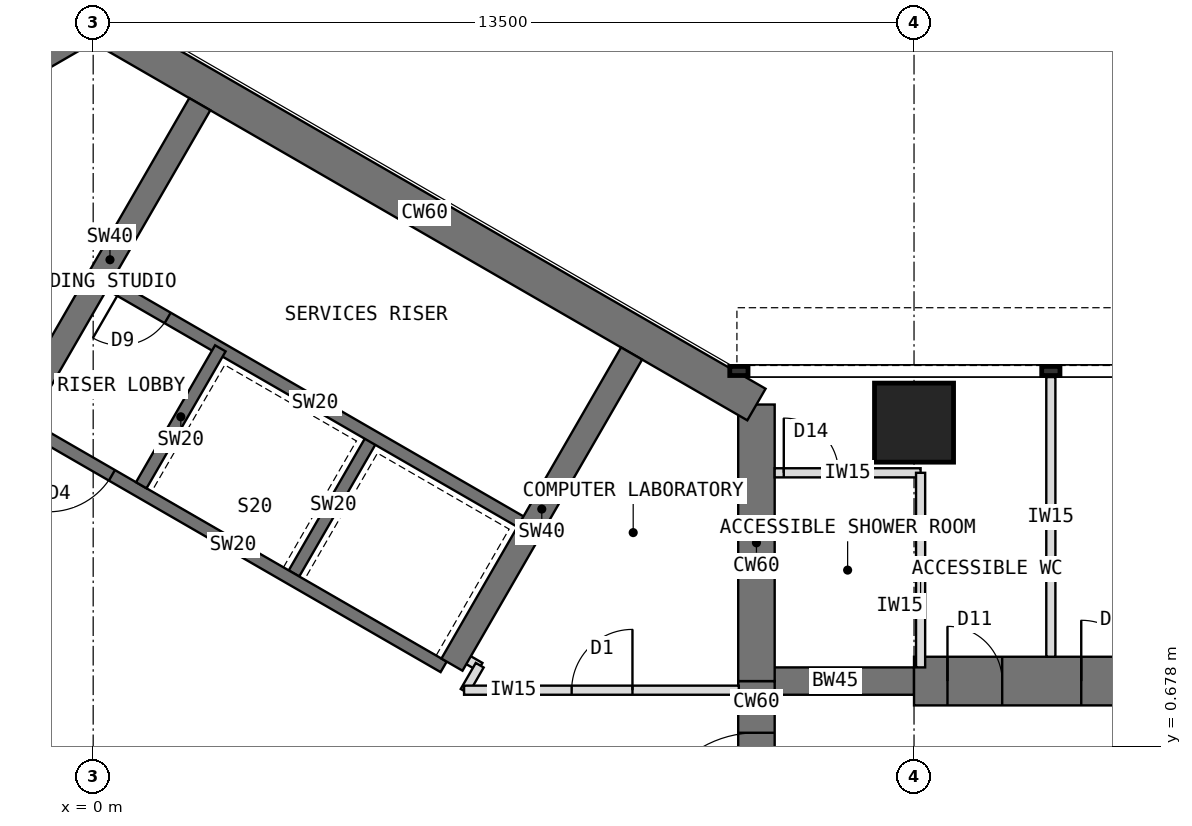
"""IFC4 building model, lengths in metres.
Left out: names, types, materials, properties, quantities, classifications, styles, units other than length and angle.
Written with IfcOpenShell. Run it as: python <this file> out.ifc"""

import sys

from ifc_helpers import new_model, si_unit, direction, frame, frame_2d, origin, origin_2d, place, context, subcontext, project, spatial, rectangle, extrude, element, fill, save


model = new_model("IFC4")
c1 = context("Model", 3, precision=1e-05, world=origin(), true_north=direction((0.0, 1.0)))
c2 = subcontext(c1, "Body", "Model", "MODEL_VIEW")
j1 = project(units=[si_unit("LENGTHUNIT", "METRE"), si_unit("PLANEANGLEUNIT", "RADIAN")], contexts=[c1])
p1 = place(None, origin())
s1 = spatial("IfcSite", under=j1, at=p1, CompositionType="ELEMENT")
p2 = place(p1, origin())
s2 = spatial("IfcBuilding", under=s1, at=p2, CompositionType="ELEMENT")
p3 = place(p2, frame((0.0, 0.0, 125.5)))
s3 = spatial("IfcBuildingStorey", under=s2, at=p3, CompositionType="ELEMENT", Elevation=125.5)
p4 = place(p3, frame((10.908, -1.75, 0.0), z_axis=(0.0, 0.0, 1.0), x_axis=(0.0, 1.0, 0.0)))
e1 = element("IfcWall", 1, at=p4, inside=s3, PredefinedType="SHEAR", context=c2, shape_type="SweptSolid", body=[
    extrude(rectangle(XDim=3.5, YDim=0.6, at=frame_2d((1.75, 0.0))), origin(), (0.0, 0.0, 1.0), 4.0),
])
p5 = place(p4, frame((0.85, 0.0, 0.0)))
e2 = element("IfcOpeningElement", 2, at=p5, cuts=e1, PredefinedType="OPENING", context=c2, shape_type="SweptSolid", body=[
    extrude(rectangle(XDim=1.8, YDim=2.1, at=frame_2d((0.9, 1.05))), frame((0.0, 0.31, 0.0), z_axis=(0.0, -1.0, 0.0), x_axis=(1.0, 0.0, 0.0)), (0.0, 0.0, 1.0), 0.62),
])
p6 = place(p3, frame((10.908, 1.75, 0.0), z_axis=(0.0, 0.0, 1.0), x_axis=(0.0, 1.0, 0.0)))
e3 = element("IfcWall", 3, at=p6, inside=s3, PredefinedType="SHEAR", context=c2, shape_type="SweptSolid", body=[
    extrude(rectangle(XDim=4.548, YDim=0.6, at=frame_2d((2.274, 0.0))), origin(), (0.0, 0.0, 1.0), 4.0),
])
p7 = place(p3, frame((10.908, 6.298, 0.0), z_axis=(0.0, 0.0, 1.0), x_axis=(-0.866021940709, 0.500005998175, 0.0)))
e4 = element("IfcWall", 4, at=p7, inside=s3, PredefinedType="SHEAR", context=c2, shape_type="SweptSolid", body=[
    extrude(rectangle(XDim=12.596, YDim=0.6, at=frame_2d((6.298, 0.0))), origin(), (0.0, 0.0, 1.0), 4.0),
])
p8 = place(p3, frame((0.0, 12.596, 0.0), z_axis=(0.0, 0.0, 1.0), x_axis=(-0.866011268655, -0.500024481964, 0.0)))
e5 = element("IfcWall", 5, at=p8, inside=s3, PredefinedType="SHEAR", context=c2, shape_type="SweptSolid", body=[
    extrude(rectangle(XDim=4.548, YDim=0.6, at=frame_2d((2.274, 0.0))), origin(), (0.0, 0.0, 1.0), 4.0),
])
p9 = place(p3, frame((10.908, 1.75, 0.0), z_axis=(0.0, 0.0, 1.0), x_axis=(1.0, 0.0, 0.0)))
e6 = element("IfcWall", 6, at=p9, inside=s3, PredefinedType="SHEAR", context=c2, shape_type="SweptSolid", body=[
    extrude(rectangle(XDim=2.592, YDim=0.45, at=frame_2d((1.296, 0.0))), origin(), (0.0, 0.0, 1.0), 4.0),
])
p10 = place(p3, frame((13.5, 1.75, 0.0), z_axis=(0.0, 0.0, 1.0), x_axis=(1.0, 0.0, 0.0)))
e7 = element("IfcWall", 7, at=p10, inside=s3, PredefinedType="SHEAR", context=c2, shape_type="SweptSolid", body=[
    extrude(rectangle(XDim=13.2, YDim=0.8, at=frame_2d((6.6, 0.0))), origin(), (0.0, 0.0, 1.0), 4.0),
])
p11 = place(p10, frame((0.55, 0.0, 0.0)))
e8 = element("IfcOpeningElement", 8, at=p11, cuts=e7, PredefinedType="OPENING", context=c2, shape_type="SweptSolid", body=[
    extrude(rectangle(XDim=0.9, YDim=2.1, at=frame_2d((0.45, 1.05))), frame((0.0, 0.41, 0.0), z_axis=(0.0, -1.0, 0.0), x_axis=(1.0, 0.0, 0.0)), (0.0, 0.0, 1.0), 0.82),
])
p12 = place(p10, frame((2.75, 0.0, 0.0)))
e9 = element("IfcOpeningElement", 9, at=p12, cuts=e7, PredefinedType="OPENING", context=c2, shape_type="SweptSolid", body=[
    extrude(rectangle(XDim=1.0, YDim=2.1, at=frame_2d((0.5, 1.05))), frame((0.0, 0.41, 0.0), z_axis=(0.0, -1.0, 0.0), x_axis=(1.0, 0.0, 0.0)), (0.0, 0.0, 1.0), 0.82),
])
p13 = place(p10, frame((7.25, 0.0, 0.0)))
e10 = element("IfcOpeningElement", 10, at=p13, cuts=e7, PredefinedType="OPENING", context=c2, shape_type="SweptSolid", body=[
    extrude(rectangle(XDim=1.0, YDim=2.1, at=frame_2d((0.5, 1.05))), frame((0.0, 0.41, 0.0), z_axis=(0.0, -1.0, 0.0), x_axis=(1.0, 0.0, 0.0)), (0.0, 0.0, 1.0), 0.82),
])
p14 = place(p3, frame((13.5, 6.0, 0.0), z_axis=(0.0, 0.0, 1.0), x_axis=(1.0, 0.0, 0.0)))
e11 = element("IfcColumn", 11, at=p14, inside=s3, PredefinedType="COLUMN", context=c2, shape_type="SweptSolid", body=[
    extrude(rectangle(XDim=1.3, YDim=1.3, at=origin_2d()), origin(), (0.0, 0.0, 1.0), 4.0),
])
p15 = place(p3, frame((5.764, 1.984, 0.0), z_axis=(0.0, 0.0, 1.0), x_axis=(-0.866026010844, 0.49999894854, 0.0)))
e12 = element("IfcWall", 12, at=p15, inside=s3, PredefinedType="SHEAR", context=c2, shape_type="SweptSolid", body=[
    extrude(rectangle(XDim=8.0, YDim=0.2, at=frame_2d((4.0, 0.0))), origin(), (0.0, 0.0, 1.0), 4.0),
])
p16 = place(p15, frame((6.3, 0.0, 0.0)))
e13 = element("IfcOpeningElement", 13, at=p16, cuts=e12, PredefinedType="OPENING", context=c2, shape_type="SweptSolid", body=[
    extrude(rectangle(XDim=1.2, YDim=2.1, at=frame_2d((0.6, 1.05))), frame((0.0, 0.11, 0.0), z_axis=(0.0, -1.0, 0.0), x_axis=(1.0, 0.0, 0.0)), (0.0, 0.0, 1.0), 0.22),
])
for number, where, z_axis, x_axis in (
    (14, (3.303, 3.52, 0.0), (0.0, 0.0, 1.0), (0.5, 0.866, 0.0)),
    (15, (0.791, 4.97, 0.0), (0.0, 0.0, 1.0), (0.5, 0.866, 0.0)),
):
    element("IfcWall", number, at=place(p3, frame(where, z_axis=z_axis, x_axis=x_axis)), inside=s3, PredefinedType="SHEAR", context=c2, shape_type="SweptSolid", body=[
        extrude(rectangle(XDim=2.6, YDim=0.2, at=frame_2d((1.3, 0.0))), origin(), (0.0, 0.0, 1.0), 4.0),
    ])
p17 = place(p3, frame((7.114, 4.322, 0.0), z_axis=(0.0, 0.0, 1.0), x_axis=(-0.866026010844, 0.49999894854, 0.0)))
e16 = element("IfcWall", 16, at=p17, inside=s3, PredefinedType="SHEAR", context=c2, shape_type="SweptSolid", body=[
    extrude(rectangle(XDim=8.0, YDim=0.2, at=frame_2d((4.0, 0.0))), origin(), (0.0, 0.0, 1.0), 4.0),
])
p18 = place(p17, frame((6.8, 0.0, 0.0)))
e17 = element("IfcOpeningElement", 17, at=p18, cuts=e16, PredefinedType="OPENING", context=c2, shape_type="SweptSolid", body=[
    extrude(rectangle(XDim=0.9, YDim=2.1, at=frame_2d((0.45, 1.05))), frame((0.0, 0.11, 0.0), z_axis=(0.0, -1.0, 0.0), x_axis=(1.0, 0.0, 0.0)), (0.0, 0.0, 1.0), 0.22),
])
p19 = place(p3, frame((-1.201, 6.12, 0.0), z_axis=(0.0, 0.0, 1.0), x_axis=(0.49999668571, 0.866027317282, 0.0)))
e18 = element("IfcWall", 18, at=p19, inside=s3, PredefinedType="SHEAR", context=c2, shape_type="SweptSolid", body=[
    extrude(rectangle(XDim=5.908, YDim=0.4, at=frame_2d((2.954, 0.0))), origin(), (0.0, 0.0, 1.0), 4.0),
])
p20 = place(p3, frame((5.901, 2.02, 0.0), z_axis=(0.0, 0.0, 1.0), x_axis=(0.500027676417, 0.866009424208, 0.0)))
e19 = element("IfcWall", 19, at=p20, inside=s3, PredefinedType="SHEAR", context=c2, shape_type="SweptSolid", body=[
    extrude(rectangle(XDim=5.908, YDim=0.4, at=frame_2d((2.954, 0.0))), origin(), (0.0, 0.0, 1.0), 4.0),
])
p21 = place(p3, frame((15.75, 2.15, 0.0), z_axis=(0.0, 0.0, 1.0), x_axis=(0.0, 1.0, 0.0)))
e20 = element("IfcWall", 20, at=p21, inside=s3, PredefinedType="PARTITIONING", context=c2, shape_type="SweptSolid", body=[
    extrude(rectangle(XDim=4.6, YDim=0.15, at=frame_2d((2.3, 0.0))), origin(), (0.0, 0.0, 1.0), 3.8),
])
p22 = place(p3, frame((11.208, 5.175, 0.0), z_axis=(0.0, 0.0, 1.0), x_axis=(1.0, 0.0, 0.0)))
e21 = element("IfcWall", 21, at=p22, inside=s3, PredefinedType="PARTITIONING", context=c2, shape_type="SweptSolid", body=[
    extrude(rectangle(XDim=2.4, YDim=0.15, at=frame_2d((1.2, 0.0))), origin(), (0.0, 0.0, 1.0), 3.8),
])
p23 = place(p22, frame((0.15, 0.0, 0.0)))
e22 = element("IfcOpeningElement", 22, at=p23, cuts=e21, PredefinedType="OPENING", context=c2, shape_type="SweptSolid", body=[
    extrude(rectangle(XDim=0.9, YDim=2.1, at=frame_2d((0.45, 1.05))), frame((0.0, 0.085, 0.0), z_axis=(0.0, -1.0, 0.0), x_axis=(1.0, 0.0, 0.0)), (0.0, 0.0, 1.0), 0.17),
])
p24 = place(p3, frame((13.608, 1.975, 0.0), z_axis=(0.0, 0.0, 1.0), x_axis=(0.0, 1.0, 0.0)))
e23 = element("IfcWall", 23, at=p24, inside=s3, PredefinedType="PARTITIONING", context=c2, shape_type="SweptSolid", body=[
    extrude(rectangle(XDim=3.2, YDim=0.15, at=frame_2d((1.6, 0.0))), origin(), (0.0, 0.0, 1.0), 3.8),
])
p25 = place(p3, frame((5.992, 2.198, 0.0), z_axis=(0.0, 0.0, 1.0), x_axis=(0.865892400268, -0.500230298122, 0.0)))
e24 = element("IfcWall", 24, at=p25, inside=s3, PredefinedType="PARTITIONING", context=c2, shape_type="SweptSolid", body=[
    extrude(rectangle(XDim=0.43, YDim=0.15, at=frame_2d((0.215, 0.0))), origin(), (0.0, 0.0, 1.0), 3.8),
])
p26 = place(p3, frame((6.357, 2.011, 0.0), z_axis=(0.0, 0.0, 1.0), x_axis=(-0.50033519877, -0.865831790172, 0.0)))
e25 = element("IfcWall", 25, at=p26, inside=s3, PredefinedType="PARTITIONING", context=c2, shape_type="SweptSolid", body=[
    extrude(rectangle(XDim=0.494, YDim=0.15, at=frame_2d((0.247, 0.0))), origin(), (0.0, 0.0, 1.0), 3.8),
])
p27 = place(p3, frame((6.1, 1.6, 0.0), z_axis=(0.0, 0.0, 1.0), x_axis=(1.0, 0.0, 0.0)))
e26 = element("IfcWall", 26, at=p27, inside=s3, PredefinedType="PARTITIONING", context=c2, shape_type="SweptSolid", body=[
    extrude(rectangle(XDim=4.519, YDim=0.15, at=frame_2d((2.259, 0.0))), origin(), (0.0, 0.0, 1.0), 3.8),
])
p28 = place(p27, frame((1.769, 0.0, 0.0)))
e27 = element("IfcOpeningElement", 27, at=p28, cuts=e26, PredefinedType="OPENING", context=c2, shape_type="SweptSolid", body=[
    extrude(rectangle(XDim=1.0, YDim=2.1, at=frame_2d((0.5, 1.05))), frame((0.0, 0.085, 0.0), z_axis=(0.0, -1.0, 0.0), x_axis=(1.0, 0.0, 0.0)), (0.0, 0.0, 1.0), 0.17),
])
p29 = place(p16, origin())
e28 = element("IfcDoor", 28, at=p29, inside=s3, OperationType="SINGLE_SWING_RIGHT", PredefinedType="DOOR", context=c2, shape_type="SweptSolid", body=[
    extrude(rectangle(XDim=1.2, YDim=2.1, at=frame_2d((0.6, 1.05))), frame((0.0, 0.025, 0.0), z_axis=(0.0, -1.0, 0.0), x_axis=(1.0, 0.0, 0.0)), (0.0, 0.0, 1.0), 0.05),
])
fill(e13, e28)
p30 = place(p18, origin())
e29 = element("IfcDoor", 29, at=p30, inside=s3, OperationType="SINGLE_SWING_RIGHT", PredefinedType="DOOR", context=c2, shape_type="SweptSolid", body=[
    extrude(rectangle(XDim=0.9, YDim=2.1, at=frame_2d((0.45, 1.05))), frame((0.0, 0.025, 0.0), z_axis=(0.0, -1.0, 0.0), x_axis=(1.0, 0.0, 0.0)), (0.0, 0.0, 1.0), 0.05),
])
fill(e17, e29)
p31 = place(p5, origin())
e30 = element("IfcDoor", 30, at=p31, inside=s3, OperationType="DOUBLE_DOOR_DOUBLE_SWING", PredefinedType="DOOR", context=c2, shape_type="SweptSolid", body=[
    extrude(rectangle(XDim=1.72, YDim=2.06, at=frame_2d((0.9, 1.03))), frame((0.0, 0.025, 0.0), z_axis=(0.0, -1.0, 0.0), x_axis=(1.0, 0.0, 0.0)), (0.0, 0.0, 1.0), 0.05),
    extrude(rectangle(XDim=0.04, YDim=2.1, at=frame_2d((0.02, 1.05))), frame((0.0, 0.3, 0.0), z_axis=(0.0, -1.0, 0.0), x_axis=(1.0, 0.0, 0.0)), (0.0, 0.0, 1.0), 0.6),
    extrude(rectangle(XDim=0.04, YDim=2.1, at=frame_2d((1.78, 1.05))), frame((0.0, 0.3, 0.0), z_axis=(0.0, -1.0, 0.0), x_axis=(1.0, 0.0, 0.0)), (0.0, 0.0, 1.0), 0.6),
    extrude(rectangle(XDim=1.72, YDim=0.04, at=frame_2d((0.9, 2.08))), frame((0.0, 0.3, 0.0), z_axis=(0.0, -1.0, 0.0), x_axis=(1.0, 0.0, 0.0)), (0.0, 0.0, 1.0), 0.6),
])
fill(e2, e30)
p32 = place(p23, origin())
e31 = element("IfcDoor", 31, at=p32, inside=s3, OperationType="SINGLE_SWING_LEFT", PredefinedType="DOOR", context=c2, shape_type="SweptSolid", body=[
    extrude(rectangle(XDim=0.9, YDim=2.1, at=frame_2d((0.45, 1.05))), frame((0.0, 0.025, 0.0), z_axis=(0.0, -1.0, 0.0), x_axis=(1.0, 0.0, 0.0)), (0.0, 0.0, 1.0), 0.05),
])
fill(e22, e31)
p33 = place(p28, origin())
e32 = element("IfcDoor", 32, at=p33, inside=s3, OperationType="SINGLE_SWING_RIGHT", PredefinedType="DOOR", context=c2, shape_type="SweptSolid", body=[
    extrude(rectangle(XDim=1.0, YDim=2.1, at=frame_2d((0.5, 1.05))), frame((0.0, 0.025, 0.0), z_axis=(0.0, -1.0, 0.0), x_axis=(1.0, 0.0, 0.0)), (0.0, 0.0, 1.0), 0.05),
])
fill(e27, e32)
p34 = place(p11, origin())
e33 = element("IfcDoor", 33, at=p34, inside=s3, OperationType="SINGLE_SWING_LEFT", PredefinedType="DOOR", context=c2, shape_type="SweptSolid", body=[
    extrude(rectangle(XDim=0.82, YDim=2.06, at=frame_2d((0.45, 1.03))), frame((0.0, 0.025, 0.0), z_axis=(0.0, -1.0, 0.0), x_axis=(1.0, 0.0, 0.0)), (0.0, 0.0, 1.0), 0.05),
    extrude(rectangle(XDim=0.04, YDim=2.1, at=frame_2d((0.02, 1.05))), frame((0.0, 0.4, 0.0), z_axis=(0.0, -1.0, 0.0), x_axis=(1.0, 0.0, 0.0)), (0.0, 0.0, 1.0), 0.8),
    extrude(rectangle(XDim=0.04, YDim=2.1, at=frame_2d((0.88, 1.05))), frame((0.0, 0.4, 0.0), z_axis=(0.0, -1.0, 0.0), x_axis=(1.0, 0.0, 0.0)), (0.0, 0.0, 1.0), 0.8),
    extrude(rectangle(XDim=0.82, YDim=0.04, at=frame_2d((0.45, 2.08))), frame((0.0, 0.4, 0.0), z_axis=(0.0, -1.0, 0.0), x_axis=(1.0, 0.0, 0.0)), (0.0, 0.0, 1.0), 0.8),
])
fill(e8, e33)
p35 = place(p12, origin())
e34 = element("IfcDoor", 34, at=p35, inside=s3, OperationType="SINGLE_SWING_LEFT", PredefinedType="DOOR", context=c2, shape_type="SweptSolid", body=[
    extrude(rectangle(XDim=0.92, YDim=2.06, at=frame_2d((0.5, 1.03))), frame((0.0, 0.025, 0.0), z_axis=(0.0, -1.0, 0.0), x_axis=(1.0, 0.0, 0.0)), (0.0, 0.0, 1.0), 0.05),
    extrude(rectangle(XDim=0.04, YDim=2.1, at=frame_2d((0.02, 1.05))), frame((0.0, 0.4, 0.0), z_axis=(0.0, -1.0, 0.0), x_axis=(1.0, 0.0, 0.0)), (0.0, 0.0, 1.0), 0.8),
    extrude(rectangle(XDim=0.04, YDim=2.1, at=frame_2d((0.98, 1.05))), frame((0.0, 0.4, 0.0), z_axis=(0.0, -1.0, 0.0), x_axis=(1.0, 0.0, 0.0)), (0.0, 0.0, 1.0), 0.8),
    extrude(rectangle(XDim=0.92, YDim=0.04, at=frame_2d((0.5, 2.08))), frame((0.0, 0.4, 0.0), z_axis=(0.0, -1.0, 0.0), x_axis=(1.0, 0.0, 0.0)), (0.0, 0.0, 1.0), 0.8),
])
fill(e9, e34)
save(model, sys.argv[1])
